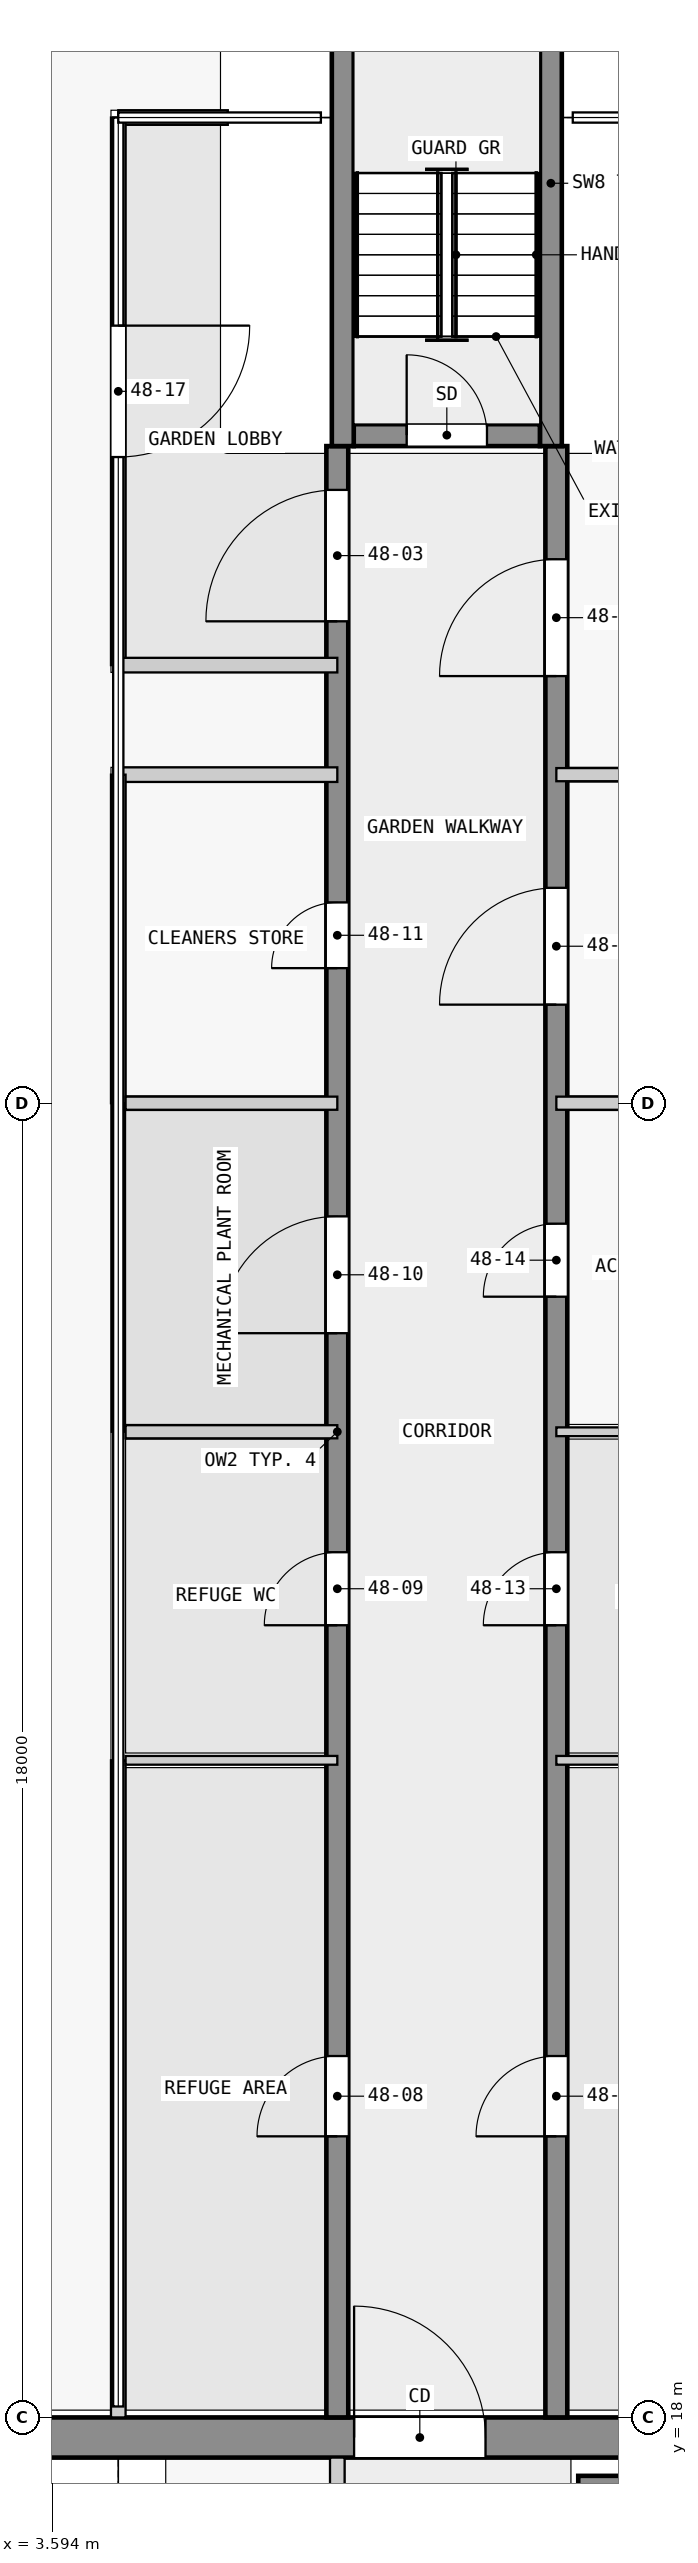
"""IFC4 building model, lengths in metres.
Left out: names, types, materials, properties, quantities, classifications, styles, units other than length and angle.
Written with IfcOpenShell. Run it as: python <this file> out.ifc"""

import sys

from ifc_helpers import new_model, si_unit, direction, frame, frame_2d, origin, place, context, subcontext, project, spatial, rectangle, extrude, element, fill, save


model = new_model("IFC4")
c1 = context("Model", 3, precision=1e-05, world=origin(), true_north=direction((0.0, 1.0)))
c2 = subcontext(c1, "Body", "Model", "MODEL_VIEW")
j1 = project(units=[si_unit("LENGTHUNIT", "METRE"), si_unit("PLANEANGLEUNIT", "RADIAN")], contexts=[c1])
p1 = place(None, origin())
s1 = spatial("IfcSite", under=j1, at=p1, CompositionType="ELEMENT")
p2 = place(p1, origin())
s2 = spatial("IfcBuilding", under=s1, at=p2, CompositionType="ELEMENT")
p3 = place(p2, frame((0.0, 0.0, 184.9)))
s3 = spatial("IfcBuildingStorey", under=s2, at=p3, CompositionType="ELEMENT", Elevation=184.9)
p4 = place(p3, frame((1.38, 17.725, 0.0), z_axis=(0.0, 0.0, 1.0), x_axis=(1.0, 0.0, 0.0)))
e1 = element("IfcWall", 1, at=p4, inside=s3, PredefinedType="SHEAR", context=c2, shape_type="SweptSolid", body=[
    extrude(rectangle(XDim=21.12, YDim=0.55, at=frame_2d((10.56, 0.0))), origin(), (0.0, 0.0, 1.0), 5.75),
])
p5 = place(p4, frame((6.35, 0.0, 0.0)))
e2 = element("IfcOpeningElement", 2, at=p5, cuts=e1, PredefinedType="OPENING", context=c2, shape_type="SweptSolid", body=[
    extrude(rectangle(XDim=1.8, YDim=2.1, at=frame_2d((0.9, 1.05))), frame((0.0, 0.285, 0.0), z_axis=(0.0, -1.0, 0.0), x_axis=(1.0, 0.0, 0.0)), (0.0, 0.0, 1.0), 0.57),
])
p6 = place(p3, frame((10.8, 17.05, 0.0), z_axis=(0.0, 0.0, 1.0), x_axis=(1.0, 0.0, 0.0)))
e3 = element("IfcWall", 3, at=p6, inside=s3, PredefinedType="SHEAR", context=c2, shape_type="SweptSolid", body=[
    extrude(rectangle(XDim=7.8, YDim=0.3, at=frame_2d((3.9, 0.0))), origin(), (0.0, 0.0, 1.0), 5.75),
])
p7 = place(p3, frame((7.725, 45.15, 0.0), z_axis=(0.0, 0.0, 1.0), x_axis=(1.0, 0.0, 0.0)))
e4 = element("IfcWall", 4, at=p7, inside=s3, PredefinedType="SHEAR", context=c2, shape_type="SweptSolid", body=[
    extrude(rectangle(XDim=2.55, YDim=0.3, at=frame_2d((1.275, 0.0))), origin(), (0.0, 0.0, 1.0), 6.0),
])
p8 = place(p7, frame((0.725, 0.0, 0.0)))
e5 = element("IfcOpeningElement", 5, at=p8, cuts=e4, PredefinedType="OPENING", context=c2, shape_type="SweptSolid", body=[
    extrude(rectangle(XDim=1.1, YDim=2.1, at=frame_2d((0.55, 1.05))), frame((0.0, 0.16, 0.0), z_axis=(0.0, -1.0, 0.0), x_axis=(1.0, 0.0, 0.0)), (0.0, 0.0, 1.0), 0.32),
])
for number, where, z_axis, x_axis in (
    (6, (7.575, 45.0, 0.0), (0.0, 0.0, 1.0), (0.0, 1.0, 0.0)),
    (7, (10.425, 45.0, 0.0), (0.0, 0.0, 1.0), (0.0, 1.0, 0.0)),
):
    element("IfcWall", number, at=place(p3, frame(where, z_axis=z_axis, x_axis=x_axis)), inside=s3, PredefinedType="SHEAR", context=c2, shape_type="SweptSolid", body=[
        extrude(rectangle(XDim=7.2, YDim=0.3, at=frame_2d((3.6, 0.0))), origin(), (0.0, 0.0, 1.0), 6.0),
    ])
p9 = place(p3, frame((7.5, 18.0, 0.0), z_axis=(0.0, 0.0, 1.0), x_axis=(0.0, 1.0, 0.0)))
e8 = element("IfcWall", 8, at=p9, inside=s3, PredefinedType="SHEAR", context=c2, shape_type="SweptSolid", body=[
    extrude(rectangle(XDim=27.0, YDim=0.3, at=frame_2d((13.5, 0.0))), origin(), (0.0, 0.0, 1.0), 5.75),
])
p10 = place(p9, frame((24.6, 0.0, 0.0)))
e9 = element("IfcOpeningElement", 9, at=p10, cuts=e8, PredefinedType="OPENING", context=c2, shape_type="SweptSolid", body=[
    extrude(rectangle(XDim=1.8, YDim=2.1, at=frame_2d((0.9, 1.05))), frame((0.0, 0.16, 0.0), z_axis=(0.0, -1.0, 0.0), x_axis=(1.0, 0.0, 0.0)), (0.0, 0.0, 1.0), 0.32),
])
p11 = place(p9, frame((3.85, 0.0, 0.0)))
e10 = element("IfcOpeningElement", 10, at=p11, cuts=e8, PredefinedType="OPENING", context=c2, shape_type="SweptSolid", body=[
    extrude(rectangle(XDim=1.1, YDim=2.1, at=frame_2d((0.55, 1.05))), frame((0.0, 0.16, 0.0), z_axis=(0.0, -1.0, 0.0), x_axis=(1.0, 0.0, 0.0)), (0.0, 0.0, 1.0), 0.32),
])
p12 = place(p9, frame((10.85, 0.0, 0.0)))
e11 = element("IfcOpeningElement", 11, at=p12, cuts=e8, PredefinedType="OPENING", context=c2, shape_type="SweptSolid", body=[
    extrude(rectangle(XDim=1.0, YDim=2.1, at=frame_2d((0.5, 1.05))), frame((0.0, 0.16, 0.0), z_axis=(0.0, -1.0, 0.0), x_axis=(1.0, 0.0, 0.0)), (0.0, 0.0, 1.0), 0.32),
])
p13 = place(p9, frame((14.85, 0.0, 0.0)))
e12 = element("IfcOpeningElement", 12, at=p13, cuts=e8, PredefinedType="OPENING", context=c2, shape_type="SweptSolid", body=[
    extrude(rectangle(XDim=1.6, YDim=2.4, at=frame_2d((0.8, 1.2))), frame((0.0, 0.16, 0.0), z_axis=(0.0, -1.0, 0.0), x_axis=(1.0, 0.0, 0.0)), (0.0, 0.0, 1.0), 0.32),
])
p14 = place(p9, frame((19.85, 0.0, 0.0)))
e13 = element("IfcOpeningElement", 13, at=p14, cuts=e8, PredefinedType="OPENING", context=c2, shape_type="SweptSolid", body=[
    extrude(rectangle(XDim=0.9, YDim=2.1, at=frame_2d((0.45, 1.05))), frame((0.0, 0.16, 0.0), z_axis=(0.0, -1.0, 0.0), x_axis=(1.0, 0.0, 0.0)), (0.0, 0.0, 1.0), 0.32),
])
p15 = place(p3, frame((10.5, 18.0, 0.0), z_axis=(0.0, 0.0, 1.0), x_axis=(0.0, 1.0, 0.0)))
e14 = element("IfcWall", 14, at=p15, inside=s3, PredefinedType="SHEAR", context=c2, shape_type="SweptSolid", body=[
    extrude(rectangle(XDim=27.0, YDim=0.3, at=frame_2d((13.5, 0.0))), origin(), (0.0, 0.0, 1.0), 5.75),
])
p16 = place(p15, frame((3.85, 0.0, 0.0)))
e15 = element("IfcOpeningElement", 15, at=p16, cuts=e14, PredefinedType="OPENING", context=c2, shape_type="SweptSolid", body=[
    extrude(rectangle(XDim=1.1, YDim=2.1, at=frame_2d((0.55, 1.05))), frame((0.0, 0.16, 0.0), z_axis=(0.0, -1.0, 0.0), x_axis=(1.0, 0.0, 0.0)), (0.0, 0.0, 1.0), 0.32),
])
p17 = place(p15, frame((10.85, 0.0, 0.0)))
e16 = element("IfcOpeningElement", 16, at=p17, cuts=e14, PredefinedType="OPENING", context=c2, shape_type="SweptSolid", body=[
    extrude(rectangle(XDim=1.0, YDim=2.1, at=frame_2d((0.5, 1.05))), frame((0.0, 0.16, 0.0), z_axis=(0.0, -1.0, 0.0), x_axis=(1.0, 0.0, 0.0)), (0.0, 0.0, 1.0), 0.32),
])
p18 = place(p15, frame((15.35, 0.0, 0.0)))
e17 = element("IfcOpeningElement", 17, at=p18, cuts=e14, PredefinedType="OPENING", context=c2, shape_type="SweptSolid", body=[
    extrude(rectangle(XDim=1.0, YDim=2.1, at=frame_2d((0.5, 1.05))), frame((0.0, 0.16, 0.0), z_axis=(0.0, -1.0, 0.0), x_axis=(1.0, 0.0, 0.0)), (0.0, 0.0, 1.0), 0.32),
])
p19 = place(p15, frame((19.35, 0.0, 0.0)))
e18 = element("IfcOpeningElement", 18, at=p19, cuts=e14, PredefinedType="OPENING", context=c2, shape_type="SweptSolid", body=[
    extrude(rectangle(XDim=1.6, YDim=2.4, at=frame_2d((0.8, 1.2))), frame((0.0, 0.16, 0.0), z_axis=(0.0, -1.0, 0.0), x_axis=(1.0, 0.0, 0.0)), (0.0, 0.0, 1.0), 0.32),
])
p20 = place(p15, frame((23.85, 0.0, 0.0)))
e19 = element("IfcOpeningElement", 19, at=p20, cuts=e14, PredefinedType="OPENING", context=c2, shape_type="SweptSolid", body=[
    extrude(rectangle(XDim=1.6, YDim=2.4, at=frame_2d((0.8, 1.2))), frame((0.0, 0.16, 0.0), z_axis=(0.0, -1.0, 0.0), x_axis=(1.0, 0.0, 0.0)), (0.0, 0.0, 1.0), 0.32),
])
p21 = place(p3, frame((7.5, 10.1, 0.0), z_axis=(0.0, 0.0, 1.0), x_axis=(0.0, 1.0, 0.0)))
e20 = element("IfcWall", 20, at=p21, inside=s3, PredefinedType="PARTITIONING", context=c2, shape_type="SweptSolid", body=[
    extrude(rectangle(XDim=7.35, YDim=0.2, at=frame_2d((3.675, 0.0))), origin(), (0.0, 0.0, 1.0), 5.75),
])
p22 = place(p21, frame((1.5, 0.0, 0.0)))
e21 = element("IfcOpeningElement", 21, at=p22, cuts=e20, PredefinedType="OPENING", context=c2, shape_type="SweptSolid", body=[
    extrude(rectangle(XDim=0.9, YDim=2.1, at=frame_2d((0.45, 1.05))), frame((0.0, 0.11, 0.0), z_axis=(0.0, -1.0, 0.0), x_axis=(1.0, 0.0, 0.0)), (0.0, 0.0, 1.0), 0.22),
])
p23 = place(p21, frame((5.175, 0.0, 0.0)))
e22 = element("IfcOpeningElement", 22, at=p23, cuts=e20, PredefinedType="OPENING", context=c2, shape_type="SweptSolid", body=[
    extrude(rectangle(XDim=0.9, YDim=2.1, at=frame_2d((0.45, 1.05))), frame((0.0, 0.11, 0.0), z_axis=(0.0, -1.0, 0.0), x_axis=(1.0, 0.0, 0.0)), (0.0, 0.0, 1.0), 0.22),
])
p24 = place(p3, frame((6.0, 49.5, 0.0), z_axis=(0.0, 0.0, 1.0), x_axis=(-1.0, 0.0, 0.0)))
e23 = element("IfcWall", 23, at=p24, inside=s3, PredefinedType="PARTITIONING", context=c2, shape_type="SweptSolid", body=[
    extrude(rectangle(XDim=1.5, YDim=0.2, at=frame_2d((0.75, 0.0))), origin(), (0.0, 0.0, 1.0), 5.75),
])
p25 = place(p3, frame((4.5, 49.5, 0.0), z_axis=(0.0, 0.0, 1.0), x_axis=(0.0, -1.0, 0.0)))
e24 = element("IfcWall", 24, at=p25, inside=s3, PredefinedType="PARTITIONING", context=c2, shape_type="SweptSolid", body=[
    extrude(rectangle(XDim=7.5, YDim=0.2, at=frame_2d((3.75, 0.0))), origin(), (0.0, 0.0, 1.0), 5.75),
])
p26 = place(p25, frame((2.85, 0.0, 0.0)))
e25 = element("IfcOpeningElement", 25, at=p26, cuts=e24, PredefinedType="OPENING", context=c2, shape_type="SweptSolid", body=[
    extrude(rectangle(XDim=1.8, YDim=2.1, at=frame_2d((0.9, 1.05))), frame((0.0, 0.11, 0.0), z_axis=(0.0, -1.0, 0.0), x_axis=(1.0, 0.0, 0.0)), (0.0, 0.0, 1.0), 0.22),
])
p27 = place(p3, frame((4.5, 42.0, 0.0), z_axis=(0.0, 0.0, 1.0), x_axis=(1.0, 0.0, 0.0)))
e26 = element("IfcWall", 26, at=p27, inside=s3, PredefinedType="PARTITIONING", context=c2, shape_type="SweptSolid", body=[
    extrude(rectangle(XDim=3.0, YDim=0.2, at=frame_2d((1.5, 0.0))), origin(), (0.0, 0.0, 1.0), 5.75),
])
p28 = place(p3, frame((4.5, 27.0, 0.0), z_axis=(0.0, 0.0, 1.0), x_axis=(0.0, -1.0, 0.0)))
e27 = element("IfcWall", 27, at=p28, inside=s3, PredefinedType="PARTITIONING", context=c2, shape_type="SweptSolid", body=[
    extrude(rectangle(XDim=9.0, YDim=0.2, at=frame_2d((4.5, 0.0))), origin(), (0.0, 0.0, 1.0), 5.75),
])
p29 = place(p3, frame((7.5, 40.5, 0.0), z_axis=(0.0, 0.0, 1.0), x_axis=(-1.0, 0.0, 0.0)))
e28 = element("IfcWall", 28, at=p29, inside=s3, PredefinedType="PARTITIONING", context=c2, shape_type="SweptSolid", body=[
    extrude(rectangle(XDim=3.0, YDim=0.2, at=frame_2d((1.5, 0.0))), origin(), (0.0, 0.0, 1.0), 5.75),
])
p30 = place(p3, frame((4.5, 40.5, 0.0), z_axis=(0.0, 0.0, 1.0), x_axis=(0.0, -1.0, 0.0)))
e29 = element("IfcWall", 29, at=p30, inside=s3, PredefinedType="PARTITIONING", context=c2, shape_type="SweptSolid", body=[
    extrude(rectangle(XDim=4.5, YDim=0.2, at=frame_2d((2.25, 0.0))), origin(), (0.0, 0.0, 1.0), 5.75),
])
p31 = place(p3, frame((4.5, 36.0, 0.0), z_axis=(0.0, 0.0, 1.0), x_axis=(0.0, -1.0, 0.0)))
e30 = element("IfcWall", 30, at=p31, inside=s3, PredefinedType="PARTITIONING", context=c2, shape_type="SweptSolid", body=[
    extrude(rectangle(XDim=4.5, YDim=0.18, at=frame_2d((2.25, 0.0))), origin(), (0.0, 0.0, 1.0), 5.75),
])
p32 = place(p3, frame((4.5, 31.5, 0.0), z_axis=(0.0, 0.0, 1.0), x_axis=(0.0, -1.0, 0.0)))
e31 = element("IfcWall", 31, at=p32, inside=s3, PredefinedType="PARTITIONING", context=c2, shape_type="SweptSolid", body=[
    extrude(rectangle(XDim=4.5, YDim=0.12, at=frame_2d((2.25, 0.0))), origin(), (0.0, 0.0, 1.0), 5.75),
])
p33 = place(p3, frame((4.6, 36.0, 0.0), z_axis=(0.0, 0.0, 1.0), x_axis=(1.0, 0.0, 0.0)))
e32 = element("IfcWall", 32, at=p33, inside=s3, PredefinedType="PARTITIONING", context=c2, shape_type="SweptSolid", body=[
    extrude(rectangle(XDim=2.9, YDim=0.18, at=frame_2d((1.45, 0.0))), origin(), (0.0, 0.0, 1.0), 5.75),
])
p34 = place(p3, frame((4.6, 27.0, 0.0), z_axis=(0.0, 0.0, 1.0), x_axis=(1.0, 0.0, 0.0)))
e33 = element("IfcWall", 33, at=p34, inside=s3, PredefinedType="PARTITIONING", context=c2, shape_type="SweptSolid", body=[
    extrude(rectangle(XDim=2.9, YDim=0.12, at=frame_2d((1.45, 0.0))), origin(), (0.0, 0.0, 1.0), 5.75),
])
for number, where, z_axis, x_axis in (
    (34, (4.6, 31.5, 0.0), (0.0, 0.0, 1.0), (1.0, 0.0, 0.0)),
    (35, (10.5, 36.0, 0.0), (0.0, 0.0, 1.0), (1.0, 0.0, 0.0)),
):
    element("IfcWall", number, at=place(p3, frame(where, z_axis=z_axis, x_axis=x_axis)), inside=s3, PredefinedType="PARTITIONING", context=c2, shape_type="SweptSolid", body=[
        extrude(rectangle(XDim=2.9, YDim=0.18, at=frame_2d((1.45, 0.0))), origin(), (0.0, 0.0, 1.0), 5.75),
    ])
for number, where, z_axis, x_axis in (
    (36, (10.5, 27.0, 0.0), (0.0, 0.0, 1.0), (1.0, 0.0, 0.0)),
    (37, (10.5, 31.5, 0.0), (0.0, 0.0, 1.0), (1.0, 0.0, 0.0)),
):
    element("IfcWall", number, at=place(p3, frame(where, z_axis=z_axis, x_axis=x_axis)), inside=s3, PredefinedType="PARTITIONING", context=c2, shape_type="SweptSolid", body=[
        extrude(rectangle(XDim=2.9, YDim=0.12, at=frame_2d((1.45, 0.0))), origin(), (0.0, 0.0, 1.0), 5.75),
    ])
p35 = place(p3, frame((10.5, 40.5, 0.0), z_axis=(0.0, 0.0, 1.0), x_axis=(1.0, 0.0, 0.0)))
e38 = element("IfcWall", 38, at=p35, inside=s3, PredefinedType="PARTITIONING", context=c2, shape_type="SweptSolid", body=[
    extrude(rectangle(XDim=2.9, YDim=0.18, at=frame_2d((1.45, 0.0))), origin(), (0.0, 0.0, 1.0), 5.75),
])
p36 = place(p5, origin())
e39 = element("IfcDoor", 39, at=p36, inside=s3, OperationType="DOUBLE_DOOR_SINGLE_SWING", PredefinedType="DOOR", context=c2, shape_type="SweptSolid", body=[
    extrude(rectangle(XDim=1.8, YDim=2.1, at=frame_2d((0.9, 1.05))), frame((0.0, 0.025, 0.0), z_axis=(0.0, -1.0, 0.0), x_axis=(1.0, 0.0, 0.0)), (0.0, 0.0, 1.0), 0.05),
])
fill(e2, e39)
p37 = place(p8, origin())
e40 = element("IfcDoor", 40, at=p37, inside=s3, OperationType="SINGLE_SWING_LEFT", PredefinedType="DOOR", context=c2, shape_type="SweptSolid", body=[
    extrude(rectangle(XDim=1.1, YDim=2.1, at=frame_2d((0.55, 1.05))), frame((0.0, 0.025, 0.0), z_axis=(0.0, -1.0, 0.0), x_axis=(1.0, 0.0, 0.0)), (0.0, 0.0, 1.0), 0.05),
])
fill(e5, e40)
p38 = place(p10, origin())
e41 = element("IfcDoor", 41, at=p38, inside=s3, OperationType="DOUBLE_DOOR_SINGLE_SWING", PredefinedType="DOOR", context=c2, shape_type="SweptSolid", body=[
    extrude(rectangle(XDim=1.8, YDim=2.1, at=frame_2d((0.9, 1.05))), frame((0.0, 0.025, 0.0), z_axis=(0.0, -1.0, 0.0), x_axis=(1.0, 0.0, 0.0)), (0.0, 0.0, 1.0), 0.05),
])
fill(e9, e41)
p39 = place(p11, origin())
e42 = element("IfcDoor", 42, at=p39, inside=s3, OperationType="SINGLE_SWING_LEFT", PredefinedType="DOOR", context=c2, shape_type="SweptSolid", body=[
    extrude(rectangle(XDim=1.1, YDim=2.1, at=frame_2d((0.55, 1.05))), frame((0.0, 0.025, 0.0), z_axis=(0.0, -1.0, 0.0), x_axis=(1.0, 0.0, 0.0)), (0.0, 0.0, 1.0), 0.05),
])
fill(e10, e42)
p40 = place(p12, origin())
e43 = element("IfcDoor", 43, at=p40, inside=s3, OperationType="SINGLE_SWING_LEFT", PredefinedType="DOOR", context=c2, shape_type="SweptSolid", body=[
    extrude(rectangle(XDim=1.0, YDim=2.1, at=frame_2d((0.5, 1.05))), frame((0.0, 0.025, 0.0), z_axis=(0.0, -1.0, 0.0), x_axis=(1.0, 0.0, 0.0)), (0.0, 0.0, 1.0), 0.05),
])
fill(e11, e43)
p41 = place(p13, origin())
e44 = element("IfcDoor", 44, at=p41, inside=s3, OperationType="SINGLE_SWING_RIGHT", PredefinedType="DOOR", context=c2, shape_type="SweptSolid", body=[
    extrude(rectangle(XDim=1.6, YDim=2.4, at=frame_2d((0.8, 1.2))), frame((0.0, 0.025, 0.0), z_axis=(0.0, -1.0, 0.0), x_axis=(1.0, 0.0, 0.0)), (0.0, 0.0, 1.0), 0.05),
])
fill(e12, e44)
p42 = place(p14, origin())
e45 = element("IfcDoor", 45, at=p42, inside=s3, OperationType="SINGLE_SWING_RIGHT", PredefinedType="DOOR", context=c2, shape_type="SweptSolid", body=[
    extrude(rectangle(XDim=0.9, YDim=2.1, at=frame_2d((0.45, 1.05))), frame((0.0, 0.025, 0.0), z_axis=(0.0, -1.0, 0.0), x_axis=(1.0, 0.0, 0.0)), (0.0, 0.0, 1.0), 0.05),
])
fill(e13, e45)
p43 = place(p16, origin())
e46 = element("IfcDoor", 46, at=p43, inside=s3, OperationType="SINGLE_SWING_LEFT", PredefinedType="DOOR", context=c2, shape_type="SweptSolid", body=[
    extrude(rectangle(XDim=1.1, YDim=2.1, at=frame_2d((0.55, 1.05))), frame((0.0, 0.025, 0.0), z_axis=(0.0, -1.0, 0.0), x_axis=(1.0, 0.0, 0.0)), (0.0, 0.0, 1.0), 0.05),
])
fill(e15, e46)
p44 = place(p17, origin())
e47 = element("IfcDoor", 47, at=p44, inside=s3, OperationType="SINGLE_SWING_LEFT", PredefinedType="DOOR", context=c2, shape_type="SweptSolid", body=[
    extrude(rectangle(XDim=1.0, YDim=2.1, at=frame_2d((0.5, 1.05))), frame((0.0, 0.025, 0.0), z_axis=(0.0, -1.0, 0.0), x_axis=(1.0, 0.0, 0.0)), (0.0, 0.0, 1.0), 0.05),
])
fill(e16, e47)
p45 = place(p18, origin())
e48 = element("IfcDoor", 48, at=p45, inside=s3, OperationType="SINGLE_SWING_RIGHT", PredefinedType="DOOR", context=c2, shape_type="SweptSolid", body=[
    extrude(rectangle(XDim=1.0, YDim=2.1, at=frame_2d((0.5, 1.05))), frame((0.0, 0.025, 0.0), z_axis=(0.0, -1.0, 0.0), x_axis=(1.0, 0.0, 0.0)), (0.0, 0.0, 1.0), 0.05),
])
fill(e17, e48)
p46 = place(p19, origin())
e49 = element("IfcDoor", 49, at=p46, inside=s3, OperationType="SINGLE_SWING_RIGHT", PredefinedType="DOOR", context=c2, shape_type="SweptSolid", body=[
    extrude(rectangle(XDim=1.6, YDim=2.4, at=frame_2d((0.8, 1.2))), frame((0.0, 0.025, 0.0), z_axis=(0.0, -1.0, 0.0), x_axis=(1.0, 0.0, 0.0)), (0.0, 0.0, 1.0), 0.05),
])
fill(e18, e49)
p47 = place(p20, origin())
e50 = element("IfcDoor", 50, at=p47, inside=s3, OperationType="SINGLE_SWING_RIGHT", PredefinedType="DOOR", context=c2, shape_type="SweptSolid", body=[
    extrude(rectangle(XDim=1.6, YDim=2.4, at=frame_2d((0.8, 1.2))), frame((0.0, 0.025, 0.0), z_axis=(0.0, -1.0, 0.0), x_axis=(1.0, 0.0, 0.0)), (0.0, 0.0, 1.0), 0.05),
])
fill(e19, e50)
p48 = place(p26, origin())
e51 = element("IfcDoor", 51, at=p48, inside=s3, OperationType="DOUBLE_DOOR_SINGLE_SWING", PredefinedType="DOOR", context=c2, shape_type="SweptSolid", body=[
    extrude(rectangle(XDim=1.8, YDim=2.1, at=frame_2d((0.9, 1.05))), frame((0.0, 0.025, 0.0), z_axis=(0.0, -1.0, 0.0), x_axis=(1.0, 0.0, 0.0)), (0.0, 0.0, 1.0), 0.05),
])
fill(e25, e51)
save(model, sys.argv[1])
